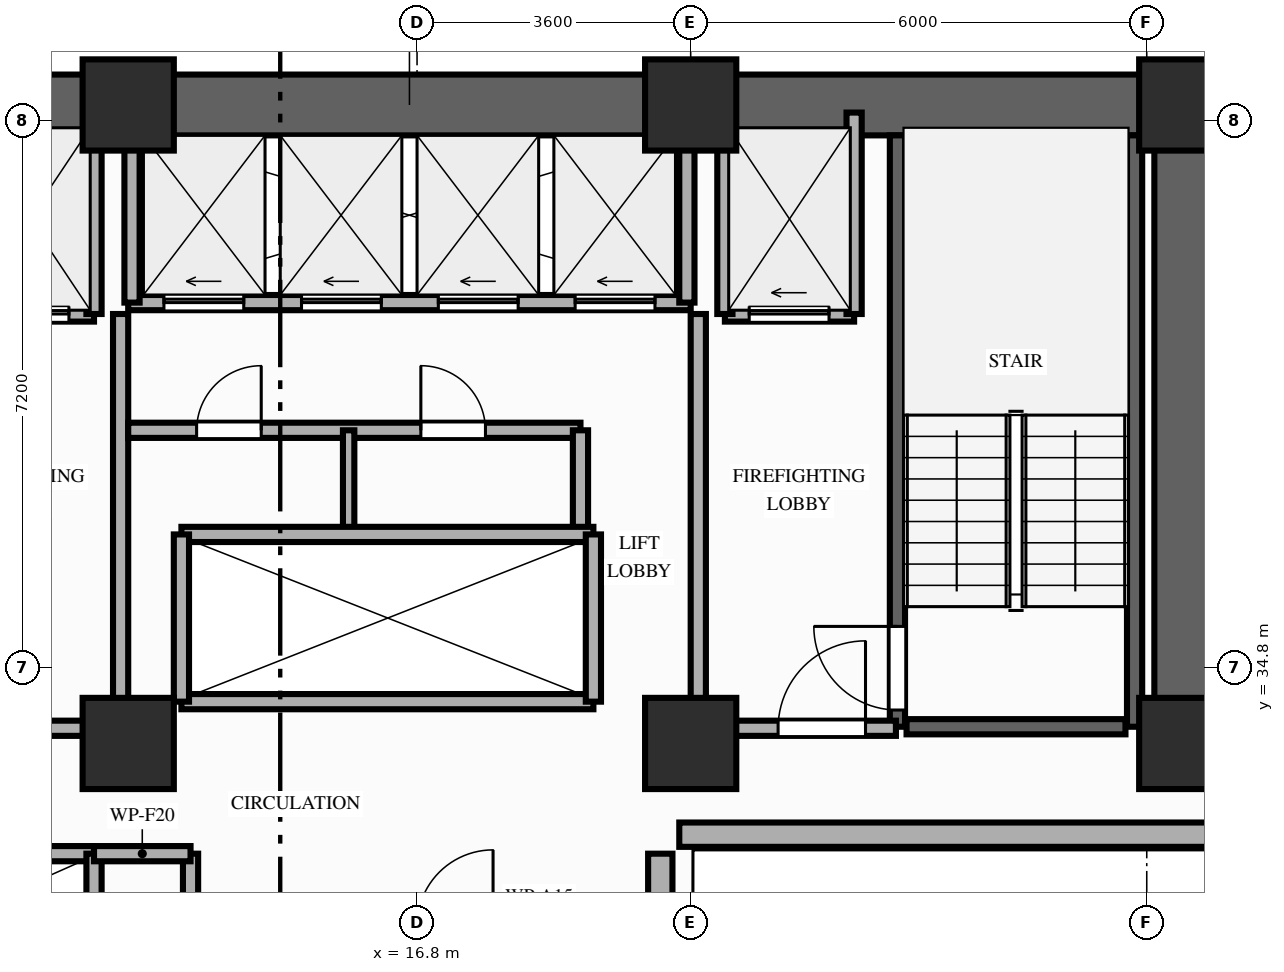
"""IFC4 building model, lengths in metres.
Left out: names, types, materials, properties, quantities, classifications, styles, units other than length and angle.
Written with IfcOpenShell. Run it as: python <this file> out.ifc"""

import sys

from ifc_helpers import new_model, si_unit, direction, frame, frame_2d, origin, origin_2d, place, context, subcontext, project, spatial, rectangle, extrude, element, fill, save


model = new_model("IFC4")
c1 = context("Model", 3, precision=1e-05, world=origin(), true_north=direction((0.0, 1.0)))
c2 = subcontext(c1, "Body", "Model", "MODEL_VIEW")
j1 = project(units=[si_unit("LENGTHUNIT", "METRE"), si_unit("PLANEANGLEUNIT", "RADIAN")], contexts=[c1])
p1 = place(None, origin())
s1 = spatial("IfcSite", under=j1, at=p1, CompositionType="ELEMENT")
p2 = place(p1, origin())
s2 = spatial("IfcBuilding", under=s1, at=p2, CompositionType="ELEMENT")
p3 = place(p2, frame((0.0, 0.0, 33.4)))
s3 = spatial("IfcBuildingStorey", under=s2, at=p3, CompositionType="ELEMENT", Elevation=33.4)
for number, where, z_axis, x_axis in (
    (1, (13.0, 33.8, 0.0), (0.0, 0.0, 1.0), (1.0, 0.0, 0.0)),
    (2, (20.4, 33.8, 0.0), (0.0, 0.0, 1.0), (1.0, 0.0, 0.0)),
    (3, (26.9, 33.8, 0.0), (0.0, 0.0, 1.0), (1.0, 0.0, 0.0)),
    (4, (13.0, 42.2, 0.0), (0.0, 0.0, 1.0), (1.0, 0.0, 0.0)),
    (5, (20.4, 42.2, 0.0), (0.0, 0.0, 1.0), (1.0, 0.0, 0.0)),
    (6, (26.9, 42.2, 0.0), (0.0, 0.0, 1.0), (1.0, 0.0, 0.0)),
):
    element("IfcColumn", number, at=place(p3, frame(where, z_axis=z_axis, x_axis=x_axis)), inside=s3, PredefinedType="COLUMN", context=c2, shape_type="SweptSolid", body=[
        extrude(rectangle(XDim=1.2, YDim=1.2, at=origin_2d()), origin(), (0.0, 0.0, 1.0), 3.2),
    ])
p4 = place(p3, frame((20.0, 8.8, 0.0), z_axis=(0.0, 0.0, 1.0), x_axis=(0.0, 1.0, 0.0)))
e7 = element("IfcWall", 7, at=p4, inside=s3, PredefinedType="STANDARD", context=c2, shape_type="SweptSolid", body=[
    extrude(rectangle(XDim=23.55, YDim=0.32, at=frame_2d((11.775, 0.0))), origin(), (0.0, 0.0, 1.0), 2.4),
])
p5 = place(p4, frame((20.73, 0.0, 0.85)))
e8 = element("IfcOpeningElement", 8, at=p5, cuts=e7, PredefinedType="OPENING", context=c2, shape_type="SweptSolid", body=[
    extrude(rectangle(XDim=1.6, YDim=1.3, at=frame_2d((0.8, 0.65))), frame((0.0, 0.17, 0.0), z_axis=(0.0, -1.0, 0.0), x_axis=(1.0, 0.0, 0.0)), (0.0, 0.0, 1.0), 0.34),
])
p6 = place(p4, frame((5.15, 0.0, 0.85)))
e9 = element("IfcOpeningElement", 9, at=p6, cuts=e7, PredefinedType="OPENING", context=c2, shape_type="SweptSolid", body=[
    extrude(rectangle(XDim=2.4, YDim=1.3, at=frame_2d((1.2, 0.65))), frame((0.0, 0.17, 0.0), z_axis=(0.0, -1.0, 0.0), x_axis=(1.0, 0.0, 0.0)), (0.0, 0.0, 1.0), 0.34),
])
p7 = place(p4, frame((10.7, 0.0, 0.85)))
e10 = element("IfcOpeningElement", 10, at=p7, cuts=e7, PredefinedType="OPENING", context=c2, shape_type="SweptSolid", body=[
    extrude(rectangle(XDim=2.4, YDim=1.3, at=frame_2d((1.2, 0.65))), frame((0.0, 0.17, 0.0), z_axis=(0.0, -1.0, 0.0), x_axis=(1.0, 0.0, 0.0)), (0.0, 0.0, 1.0), 0.34),
])
p8 = place(p3, frame((20.25, 32.6, 0.0), z_axis=(0.0, 0.0, 1.0), x_axis=(1.0, 0.0, 0.0)))
e11 = element("IfcWall", 11, at=p8, inside=s3, PredefinedType="STANDARD", context=c2, shape_type="SweptSolid", body=[
    extrude(rectangle(XDim=7.35, YDim=0.32, at=frame_2d((3.675, 0.0))), origin(), (0.0, 0.0, 1.0), 2.4),
])
p9 = place(p3, frame((6.45, 42.2, 0.0), z_axis=(0.0, 0.0, 1.0), x_axis=(1.0, 0.0, 0.0)))
e12 = element("IfcWall", 12, at=p9, inside=s3, PredefinedType="SHEAR", context=c2, shape_type="SweptSolid", body=[
    extrude(rectangle(XDim=20.45, YDim=0.8, at=frame_2d((10.225, 0.0))), origin(), (0.0, 0.0, 1.0), 3.02),
])
p10 = place(p3, frame((26.9, 33.8, 0.0), z_axis=(0.0, 0.0, 1.0), x_axis=(0.0, 1.0, 0.0)))
e13 = element("IfcWall", 13, at=p10, inside=s3, PredefinedType="SHEAR", context=c2, shape_type="SweptSolid", body=[
    extrude(rectangle(XDim=7.95, YDim=0.8, at=frame_2d((3.975, 0.0))), origin(), (0.0, 0.0, 1.0), 3.02),
])
p11 = place(p3, frame((23.12, 34.02, 0.0), z_axis=(0.0, 0.0, 1.0), x_axis=(0.0, 1.0, 0.0)))
e14 = element("IfcWall", 14, at=p11, inside=s3, PredefinedType="SHEAR", context=c2, shape_type="SweptSolid", body=[
    extrude(rectangle(XDim=7.78, YDim=0.2, at=frame_2d((3.89, 0.0))), origin(), (0.0, 0.0, 1.0), 3.02),
])
p12 = place(p11, frame((0.22, 0.0, 0.0)))
e15 = element("IfcOpeningElement", 15, at=p12, cuts=e14, PredefinedType="OPENING", context=c2, shape_type="SweptSolid", body=[
    extrude(rectangle(XDim=1.1, YDim=2.15, at=frame_2d((0.55, 1.075))), frame((0.0, 0.11, 0.0), z_axis=(0.0, -1.0, 0.0), x_axis=(1.0, 0.0, 0.0)), (0.0, 0.0, 1.0), 0.22),
])
p13 = place(p3, frame((26.24, 34.02, 0.0), z_axis=(0.0, 0.0, 1.0), x_axis=(0.0, 1.0, 0.0)))
e16 = element("IfcWall", 16, at=p13, inside=s3, PredefinedType="SHEAR", context=c2, shape_type="SweptSolid", body=[
    extrude(rectangle(XDim=7.78, YDim=0.2, at=frame_2d((3.89, 0.0))), origin(), (0.0, 0.0, 1.0), 3.02),
])
p14 = place(p3, frame((23.24, 34.02, 0.0), z_axis=(0.0, 0.0, 1.0), x_axis=(1.0, 0.0, 0.0)))
e17 = element("IfcWall", 17, at=p14, inside=s3, PredefinedType="SHEAR", context=c2, shape_type="SweptSolid", body=[
    extrude(rectangle(XDim=2.88, YDim=0.2, at=frame_2d((1.44, 0.0))), origin(), (0.0, 0.0, 1.0), 3.02),
])
p15 = place(p3, frame((7.0, 32.35, 0.0), z_axis=(0.0, 0.0, 1.0), x_axis=(1.0, 0.0, 0.0)))
e18 = element("IfcWall", 18, at=p15, inside=s3, PredefinedType="MOVABLE", context=c2, shape_type="SweptSolid", body=[
    extrude(rectangle(XDim=5.55, YDim=0.2, at=frame_2d((2.775, 0.0))), origin(), (0.0, 0.0, 1.0), 3.02),
])
p16 = place(p3, frame((12.55, 29.85, 0.0), z_axis=(0.0, 0.0, 1.0), x_axis=(0.0, 1.0, 0.0)))
e19 = element("IfcWall", 19, at=p16, inside=s3, PredefinedType="MOVABLE", context=c2, shape_type="SweptSolid", body=[
    extrude(rectangle(XDim=2.5, YDim=0.2, at=frame_2d((1.25, 0.0))), origin(), (0.0, 0.0, 1.0), 3.02),
])
p17 = place(p3, frame((10.85, 39.45, 0.0), z_axis=(0.0, 0.0, 1.0), x_axis=(1.0, 0.0, 0.0)))
e20 = element("IfcWall", 20, at=p17, inside=s3, PredefinedType="MOVABLE", context=c2, shape_type="SweptSolid", body=[
    extrude(rectangle(XDim=1.7, YDim=0.2, at=frame_2d((0.85, 0.0))), origin(), (0.0, 0.0, 1.0), 3.02),
])
p18 = place(p17, frame((0.32, 0.0, 0.0)))
e21 = element("IfcOpeningElement", 21, at=p18, cuts=e20, PredefinedType="OPENING", context=c2, shape_type="SweptSolid", body=[
    extrude(rectangle(XDim=1.05, YDim=2.15, at=frame_2d((0.525, 1.075))), frame((0.0, 0.11, 0.0), z_axis=(0.0, -1.0, 0.0), x_axis=(1.0, 0.0, 0.0)), (0.0, 0.0, 1.0), 0.22),
])
p19 = place(p3, frame((20.85, 39.45, 0.0), z_axis=(0.0, 0.0, 1.0), x_axis=(1.0, 0.0, 0.0)))
e22 = element("IfcWall", 22, at=p19, inside=s3, PredefinedType="MOVABLE", context=c2, shape_type="SweptSolid", body=[
    extrude(rectangle(XDim=1.7, YDim=0.2, at=frame_2d((0.85, 0.0))), origin(), (0.0, 0.0, 1.0), 3.02),
])
p20 = place(p19, frame((0.32, 0.0, 0.0)))
e23 = element("IfcOpeningElement", 23, at=p20, cuts=e22, PredefinedType="OPENING", context=c2, shape_type="SweptSolid", body=[
    extrude(rectangle(XDim=1.05, YDim=2.15, at=frame_2d((0.525, 1.075))), frame((0.0, 0.11, 0.0), z_axis=(0.0, -1.0, 0.0), x_axis=(1.0, 0.0, 0.0)), (0.0, 0.0, 1.0), 0.22),
])
p21 = place(p3, frame((12.55, 39.45, 0.0), z_axis=(0.0, 0.0, 1.0), x_axis=(0.0, 1.0, 0.0)))
e24 = element("IfcWall", 24, at=p21, inside=s3, PredefinedType="MOVABLE", context=c2, shape_type="SweptSolid", body=[
    extrude(rectangle(XDim=2.65, YDim=0.2, at=frame_2d((1.325, 0.0))), origin(), (0.0, 0.0, 1.0), 2.4),
])
p22 = place(p3, frame((12.9, 34.0, 0.0), z_axis=(0.0, 0.0, 1.0), x_axis=(0.0, 1.0, 0.0)))
e25 = element("IfcWall", 25, at=p22, inside=s3, PredefinedType="PARTITIONING", context=c2, shape_type="SweptSolid", body=[
    extrude(rectangle(XDim=5.45, YDim=0.2, at=frame_2d((2.725, 0.0))), origin(), (0.0, 0.0, 1.0), 2.4),
])
p23 = place(p3, frame((10.24, 34.0, 0.0), z_axis=(0.0, 0.0, 1.0), x_axis=(1.0, 0.0, 0.0)))
e26 = element("IfcWall", 26, at=p23, inside=s3, PredefinedType="PARTITIONING", context=c2, shape_type="SweptSolid", body=[
    extrude(rectangle(XDim=2.66, YDim=0.2, at=frame_2d((1.33, 0.0))), origin(), (0.0, 0.0, 1.0), 2.4),
])
p24 = place(p23, frame((0.35, 0.0, 0.0)))
e27 = element("IfcOpeningElement", 27, at=p24, cuts=e26, PredefinedType="OPENING", context=c2, shape_type="SweptSolid", body=[
    extrude(rectangle(XDim=1.15, YDim=2.15, at=frame_2d((0.575, 1.075))), frame((0.0, 0.11, 0.0), z_axis=(0.0, -1.0, 0.0), x_axis=(1.0, 0.0, 0.0)), (0.0, 0.0, 1.0), 0.22),
])
for number, where, z_axis, x_axis in (
    (28, (20.85, 39.45, 0.0), (0.0, 0.0, 1.0), (0.0, 1.0, 0.0)),
    (29, (22.55, 39.45, 0.0), (0.0, 0.0, 1.0), (0.0, 1.0, 0.0)),
):
    element("IfcWall", number, at=place(p3, frame(where, z_axis=z_axis, x_axis=x_axis)), inside=s3, PredefinedType="MOVABLE", context=c2, shape_type="SweptSolid", body=[
        extrude(rectangle(XDim=2.65, YDim=0.2, at=frame_2d((1.325, 0.0))), origin(), (0.0, 0.0, 1.0), 2.4),
    ])
p25 = place(p3, frame((20.5, 34.0, 0.0), z_axis=(0.0, 0.0, 1.0), x_axis=(0.0, 1.0, 0.0)))
e30 = element("IfcWall", 30, at=p25, inside=s3, PredefinedType="PARTITIONING", context=c2, shape_type="SweptSolid", body=[
    extrude(rectangle(XDim=5.45, YDim=0.2, at=frame_2d((2.725, 0.0))), origin(), (0.0, 0.0, 1.0), 2.4),
])
p26 = place(p3, frame((20.5, 34.0, 0.0), z_axis=(0.0, 0.0, 1.0), x_axis=(1.0, 0.0, 0.0)))
e31 = element("IfcWall", 31, at=p26, inside=s3, PredefinedType="PARTITIONING", context=c2, shape_type="SweptSolid", body=[
    extrude(rectangle(XDim=2.6, YDim=0.2, at=frame_2d((1.3, 0.0))), origin(), (0.0, 0.0, 1.0), 2.4),
])
p27 = place(p26, frame((1.05, 0.0, 0.0)))
e32 = element("IfcOpeningElement", 32, at=p27, cuts=e31, PredefinedType="OPENING", context=c2, shape_type="SweptSolid", body=[
    extrude(rectangle(XDim=1.15, YDim=2.15, at=frame_2d((0.575, 1.075))), frame((0.0, 0.11, 0.0), z_axis=(0.0, -1.0, 0.0), x_axis=(1.0, 0.0, 0.0)), (0.0, 0.0, 1.0), 0.22),
])
p28 = place(p3, frame((13.82, 29.85, 0.0), z_axis=(0.0, 0.0, 1.0), x_axis=(0.0, 1.0, 0.0)))
e33 = element("IfcWall", 33, at=p28, inside=s3, PredefinedType="PARTITIONING", context=c2, shape_type="SweptSolid", body=[
    extrude(rectangle(XDim=2.5, YDim=0.2, at=frame_2d((1.25, 0.0))), origin(), (0.0, 0.0, 1.0), 3.02),
])
p29 = place(p3, frame((12.55, 32.35, 0.0), z_axis=(0.0, 0.0, 1.0), x_axis=(1.0, 0.0, 0.0)))
e34 = element("IfcWall", 34, at=p29, inside=s3, PredefinedType="PARTITIONING", context=c2, shape_type="SweptSolid", body=[
    extrude(rectangle(XDim=1.27, YDim=0.2, at=frame_2d((0.635, 0.0))), origin(), (0.0, 0.0, 1.0), 3.02),
])
p30 = place(p3, frame((13.0, 39.6, 0.0), z_axis=(0.0, 0.0, 1.0), x_axis=(1.0, 0.0, 0.0)))
e35 = element("IfcWall", 35, at=p30, inside=s3, PredefinedType="MOVABLE", context=c2, shape_type="SweptSolid", body=[
    extrude(rectangle(XDim=7.4, YDim=0.2, at=frame_2d((3.7, 0.0))), origin(), (0.0, 0.0, 1.0), 3.02),
])
p31 = place(p30, frame((0.47, 0.0, 0.0)))
e36 = element("IfcOpeningElement", 36, at=p31, cuts=e35, PredefinedType="OPENING", context=c2, shape_type="SweptSolid", body=[
    extrude(rectangle(XDim=1.05, YDim=2.15, at=frame_2d((0.525, 1.075))), frame((0.0, 0.11, 0.0), z_axis=(0.0, -1.0, 0.0), x_axis=(1.0, 0.0, 0.0)), (0.0, 0.0, 1.0), 0.22),
])
p32 = place(p30, frame((2.28, 0.0, 0.0)))
e37 = element("IfcOpeningElement", 37, at=p32, cuts=e35, PredefinedType="OPENING", context=c2, shape_type="SweptSolid", body=[
    extrude(rectangle(XDim=1.05, YDim=2.15, at=frame_2d((0.525, 1.075))), frame((0.0, 0.11, 0.0), z_axis=(0.0, -1.0, 0.0), x_axis=(1.0, 0.0, 0.0)), (0.0, 0.0, 1.0), 0.22),
])
p33 = place(p30, frame((4.08, 0.0, 0.0)))
e38 = element("IfcOpeningElement", 38, at=p33, cuts=e35, PredefinedType="OPENING", context=c2, shape_type="SweptSolid", body=[
    extrude(rectangle(XDim=1.05, YDim=2.15, at=frame_2d((0.525, 1.075))), frame((0.0, 0.11, 0.0), z_axis=(0.0, -1.0, 0.0), x_axis=(1.0, 0.0, 0.0)), (0.0, 0.0, 1.0), 0.22),
])
p34 = place(p30, frame((5.88, 0.0, 0.0)))
e39 = element("IfcOpeningElement", 39, at=p34, cuts=e35, PredefinedType="OPENING", context=c2, shape_type="SweptSolid", body=[
    extrude(rectangle(XDim=1.05, YDim=2.15, at=frame_2d((0.525, 1.075))), frame((0.0, 0.11, 0.0), z_axis=(0.0, -1.0, 0.0), x_axis=(1.0, 0.0, 0.0)), (0.0, 0.0, 1.0), 0.22),
])
for number, where, z_axis, x_axis in (
    (40, (13.05, 39.6, 0.0), (0.0, 0.0, 1.0), (0.0, 1.0, 0.0)),
    (41, (20.35, 39.6, 0.0), (0.0, 0.0, 1.0), (0.0, 1.0, 0.0)),
):
    element("IfcWall", number, at=place(p3, frame(where, z_axis=z_axis, x_axis=x_axis)), inside=s3, PredefinedType="MOVABLE", context=c2, shape_type="SweptSolid", body=[
        extrude(rectangle(XDim=2.18, YDim=0.2, at=frame_2d((1.09, 0.0))), origin(), (0.0, 0.0, 1.0), 3.02),
    ])
p35 = place(p3, frame((13.0, 37.92, 0.0), z_axis=(0.0, 0.0, 1.0), x_axis=(1.0, 0.0, 0.0)))
e42 = element("IfcWall", 42, at=p35, inside=s3, PredefinedType="PARTITIONING", context=c2, shape_type="SweptSolid", body=[
    extrude(rectangle(XDim=5.95, YDim=0.2, at=frame_2d((2.975, 0.0))), origin(), (0.0, 0.0, 1.0), 3.02),
])
p36 = place(p35, frame((0.9, 0.0, 0.0)))
e43 = element("IfcOpeningElement", 43, at=p36, cuts=e42, PredefinedType="OPENING", context=c2, shape_type="SweptSolid", body=[
    extrude(rectangle(XDim=0.85, YDim=2.05, at=frame_2d((0.425, 1.025))), frame((0.0, 0.11, 0.0), z_axis=(0.0, -1.0, 0.0), x_axis=(1.0, 0.0, 0.0)), (0.0, 0.0, 1.0), 0.22),
])
p37 = place(p35, frame((3.85, 0.0, 0.0)))
e44 = element("IfcOpeningElement", 44, at=p37, cuts=e42, PredefinedType="OPENING", context=c2, shape_type="SweptSolid", body=[
    extrude(rectangle(XDim=0.85, YDim=2.05, at=frame_2d((0.425, 1.025))), frame((0.0, 0.11, 0.0), z_axis=(0.0, -1.0, 0.0), x_axis=(1.0, 0.0, 0.0)), (0.0, 0.0, 1.0), 0.22),
])
p38 = place(p3, frame((18.95, 36.6, 0.0), z_axis=(0.0, 0.0, 1.0), x_axis=(0.0, 1.0, 0.0)))
e45 = element("IfcWall", 45, at=p38, inside=s3, PredefinedType="PARTITIONING", context=c2, shape_type="SweptSolid", body=[
    extrude(rectangle(XDim=1.32, YDim=0.2, at=frame_2d((0.66, 0.0))), origin(), (0.0, 0.0, 1.0), 3.02),
])
p39 = place(p3, frame((15.9, 36.6, 0.0), z_axis=(0.0, 0.0, 1.0), x_axis=(0.0, 1.0, 0.0)))
e46 = element("IfcWall", 46, at=p39, inside=s3, PredefinedType="PARTITIONING", context=c2, shape_type="SweptSolid", body=[
    extrude(rectangle(XDim=1.32, YDim=0.15, at=frame_2d((0.66, 0.0))), origin(), (0.0, 0.0, 1.0), 3.02),
])
for number, where, z_axis, x_axis in (
    (47, (13.7, 34.35, 0.0), (0.0, 0.0, 1.0), (1.0, 0.0, 0.0)),
    (48, (13.7, 36.55, 0.0), (0.0, 0.0, 1.0), (1.0, 0.0, 0.0)),
):
    element("IfcWall", number, at=place(p3, frame(where, z_axis=z_axis, x_axis=x_axis)), inside=s3, PredefinedType="MOVABLE", context=c2, shape_type="SweptSolid", body=[
        extrude(rectangle(XDim=5.42, YDim=0.2, at=frame_2d((2.71, 0.0))), origin(), (0.0, 0.0, 1.0), 3.02),
    ])
for number, where, z_axis, x_axis in (
    (49, (13.7, 34.35, 0.0), (0.0, 0.0, 1.0), (0.0, 1.0, 0.0)),
    (50, (19.12, 34.35, 0.0), (0.0, 0.0, 1.0), (0.0, 1.0, 0.0)),
):
    element("IfcWall", number, at=place(p3, frame(where, z_axis=z_axis, x_axis=x_axis)), inside=s3, PredefinedType="MOVABLE", context=c2, shape_type="SweptSolid", body=[
        extrude(rectangle(XDim=2.2, YDim=0.2, at=frame_2d((1.1, 0.0))), origin(), (0.0, 0.0, 1.0), 3.02),
    ])
p40 = place(p12, origin())
e51 = element("IfcDoor", 51, at=p40, inside=s3, OperationType="SINGLE_SWING_RIGHT", PredefinedType="DOOR", context=c2, shape_type="SweptSolid", body=[
    extrude(rectangle(XDim=1.1, YDim=2.15, at=frame_2d((0.55, 1.075))), frame((0.0, 0.025, 0.0), z_axis=(0.0, -1.0, 0.0), x_axis=(1.0, 0.0, 0.0)), (0.0, 0.0, 1.0), 0.05),
])
fill(e15, e51)
p41 = place(p18, origin())
e52 = element("IfcDoor", 52, at=p41, inside=s3, OperationType="SLIDING_TO_LEFT", PredefinedType="DOOR", context=c2, shape_type="SweptSolid", body=[
    extrude(rectangle(XDim=1.05, YDim=2.15, at=frame_2d((0.525, 1.075))), frame((0.0, 0.025, 0.0), z_axis=(0.0, -1.0, 0.0), x_axis=(1.0, 0.0, 0.0)), (0.0, 0.0, 1.0), 0.05),
])
fill(e21, e52)
p42 = place(p20, origin())
e53 = element("IfcDoor", 53, at=p42, inside=s3, OperationType="SLIDING_TO_LEFT", PredefinedType="DOOR", context=c2, shape_type="SweptSolid", body=[
    extrude(rectangle(XDim=1.05, YDim=2.15, at=frame_2d((0.525, 1.075))), frame((0.0, 0.025, 0.0), z_axis=(0.0, -1.0, 0.0), x_axis=(1.0, 0.0, 0.0)), (0.0, 0.0, 1.0), 0.05),
])
fill(e23, e53)
p43 = place(p27, origin())
e54 = element("IfcDoor", 54, at=p43, inside=s3, OperationType="SINGLE_SWING_RIGHT", PredefinedType="DOOR", context=c2, shape_type="SweptSolid", body=[
    extrude(rectangle(XDim=1.15, YDim=2.15, at=frame_2d((0.575, 1.075))), frame((0.0, 0.025, 0.0), z_axis=(0.0, -1.0, 0.0), x_axis=(1.0, 0.0, 0.0)), (0.0, 0.0, 1.0), 0.05),
])
fill(e32, e54)
p44 = place(p31, origin())
e55 = element("IfcDoor", 55, at=p44, inside=s3, OperationType="SLIDING_TO_LEFT", PredefinedType="DOOR", context=c2, shape_type="SweptSolid", body=[
    extrude(rectangle(XDim=1.05, YDim=2.15, at=frame_2d((0.525, 1.075))), frame((0.0, 0.025, 0.0), z_axis=(0.0, -1.0, 0.0), x_axis=(1.0, 0.0, 0.0)), (0.0, 0.0, 1.0), 0.05),
])
fill(e36, e55)
p45 = place(p32, origin())
e56 = element("IfcDoor", 56, at=p45, inside=s3, OperationType="SLIDING_TO_LEFT", PredefinedType="DOOR", context=c2, shape_type="SweptSolid", body=[
    extrude(rectangle(XDim=1.05, YDim=2.15, at=frame_2d((0.525, 1.075))), frame((0.0, 0.025, 0.0), z_axis=(0.0, -1.0, 0.0), x_axis=(1.0, 0.0, 0.0)), (0.0, 0.0, 1.0), 0.05),
])
fill(e37, e56)
p46 = place(p33, origin())
e57 = element("IfcDoor", 57, at=p46, inside=s3, OperationType="SLIDING_TO_LEFT", PredefinedType="DOOR", context=c2, shape_type="SweptSolid", body=[
    extrude(rectangle(XDim=1.05, YDim=2.15, at=frame_2d((0.525, 1.075))), frame((0.0, 0.025, 0.0), z_axis=(0.0, -1.0, 0.0), x_axis=(1.0, 0.0, 0.0)), (0.0, 0.0, 1.0), 0.05),
])
fill(e38, e57)
p47 = place(p34, origin())
e58 = element("IfcDoor", 58, at=p47, inside=s3, OperationType="SLIDING_TO_LEFT", PredefinedType="DOOR", context=c2, shape_type="SweptSolid", body=[
    extrude(rectangle(XDim=1.05, YDim=2.15, at=frame_2d((0.525, 1.075))), frame((0.0, 0.025, 0.0), z_axis=(0.0, -1.0, 0.0), x_axis=(1.0, 0.0, 0.0)), (0.0, 0.0, 1.0), 0.05),
])
fill(e39, e58)
p48 = place(p36, origin())
e59 = element("IfcDoor", 59, at=p48, inside=s3, OperationType="SINGLE_SWING_RIGHT", PredefinedType="DOOR", context=c2, shape_type="SweptSolid", body=[
    extrude(rectangle(XDim=0.85, YDim=2.05, at=frame_2d((0.425, 1.025))), frame((0.0, 0.025, 0.0), z_axis=(0.0, -1.0, 0.0), x_axis=(1.0, 0.0, 0.0)), (0.0, 0.0, 1.0), 0.05),
])
fill(e43, e59)
p49 = place(p37, origin())
e60 = element("IfcDoor", 60, at=p49, inside=s3, OperationType="SINGLE_SWING_LEFT", PredefinedType="DOOR", context=c2, shape_type="SweptSolid", body=[
    extrude(rectangle(XDim=0.85, YDim=2.05, at=frame_2d((0.425, 1.025))), frame((0.0, 0.025, 0.0), z_axis=(0.0, -1.0, 0.0), x_axis=(1.0, 0.0, 0.0)), (0.0, 0.0, 1.0), 0.05),
])
fill(e44, e60)
save(model, sys.argv[1])
